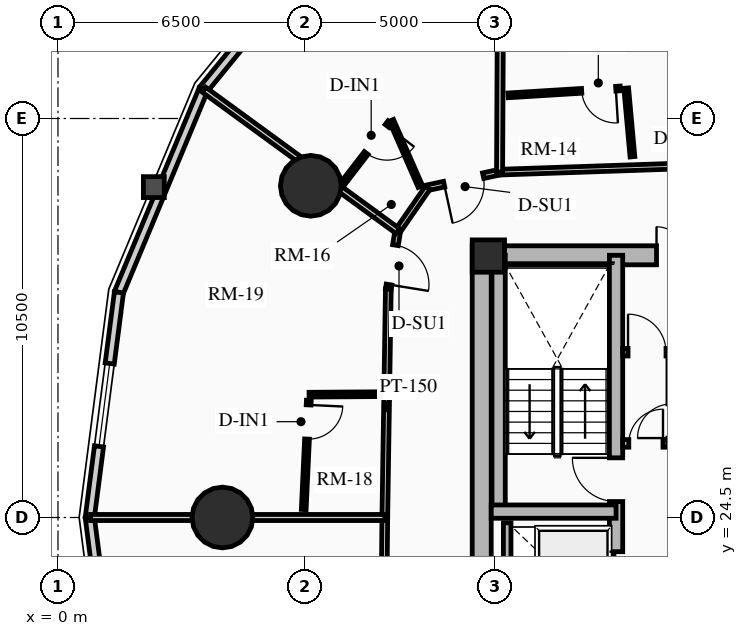
"""IFC4 building model, lengths in metres.
Left out: names, types, materials, properties, quantities, classifications, styles, units other than length and angle.
Written with IfcOpenShell. Run it as: python <this file> out.ifc"""

import sys

from ifc_helpers import new_model, si_unit, direction, frame, frame_2d, origin, origin_2d, place, context, subcontext, project, spatial, rectangle, circle, extrude, source, transform, mapped, element, fill, save


model = new_model("IFC4")
c1 = context("Model", 3, precision=1e-05, world=origin(), true_north=direction((0.0, 1.0)))
c2 = subcontext(c1, "Body", "Model", "MODEL_VIEW")
j1 = project(units=[si_unit("LENGTHUNIT", "METRE"), si_unit("PLANEANGLEUNIT", "RADIAN")], contexts=[c1])
p1 = place(None, origin())
s1 = spatial("IfcSite", under=j1, at=p1, CompositionType="ELEMENT")
p2 = place(p1, origin())
s2 = spatial("IfcBuilding", under=s1, at=p2, CompositionType="ELEMENT")
p3 = place(p2, frame((0.0, 0.0, 51.1)))
s3 = spatial("IfcBuildingStorey", under=s2, at=p3, CompositionType="ELEMENT", Elevation=51.1)
p4 = place(p3, frame((11.15, 17.35, 0.0), z_axis=(0.0, 0.0, 1.0), x_axis=(0.0, 1.0, 0.0)))
e1 = element("IfcWall", 1, at=p4, inside=s3, PredefinedType="SHEAR", context=c2, shape_type="SweptSolid", body=[
    extrude(rectangle(XDim=14.3, YDim=0.5, at=frame_2d((7.15, 0.0))), origin(), (0.0, 0.0, 1.0), 2.91),
])
p5 = place(p3, frame((11.15, 31.4, 0.0), z_axis=(0.0, 0.0, 1.0), x_axis=(1.0, 0.0, 0.0)))
e2 = element("IfcWall", 2, at=p5, inside=s3, PredefinedType="SHEAR", context=c2, shape_type="SweptSolid", body=[
    extrude(rectangle(XDim=10.7, YDim=0.5, at=frame_2d((5.35, 0.0))), origin(), (0.0, 0.0, 1.0), 2.91),
])
m1 = source(origin(), c2, "Body", "SweptSolid", [
    extrude(rectangle(XDim=1.5, YDim=2.02, at=frame_2d((0.75, 1.01))), frame((0.0, 0.26, 0.0), z_axis=(0.0, -1.0, 0.0), x_axis=(1.0, 0.0, 0.0)), (0.0, 0.0, 1.0), 0.52),
])
p6 = place(p5, frame((4.6, 0.0, 0.0)))
e3 = element("IfcOpeningElement", 3, at=p6, cuts=e2, PredefinedType="OPENING", context=c2, shape_type="MappedRepresentation", body=[
    mapped(m1, transform((0.0, 0.0, 0.0), x_axis=(1.0, 0.0, 0.0), y_axis=(0.0, 1.0, 0.0), z_axis=(0.0, 0.0, 1.0), scale=1.0)),
])
p7 = place(p3, frame((14.685, 17.6, 0.0), z_axis=(0.0, 0.0, 1.0), x_axis=(0.0, 1.0, 0.0)))
e4 = element("IfcWall", 4, at=p7, inside=s3, PredefinedType="SHEAR", context=c2, shape_type="SweptSolid", body=[
    extrude(rectangle(XDim=13.8, YDim=0.35, at=frame_2d((6.9, 0.0))), origin(), (0.0, 0.0, 1.0), 2.91),
])
m2 = source(origin(), c2, "Body", "SweptSolid", [
    extrude(rectangle(XDim=1.1, YDim=2.015, at=frame_2d((0.55, 1.007))), frame((0.0, 0.185, 0.0), z_axis=(0.0, -1.0, 0.0), x_axis=(1.0, 0.0, 0.0)), (0.0, 0.0, 1.0), 0.37),
])
p8 = place(p7, frame((4.9, 0.0, 0.0)))
e5 = element("IfcOpeningElement", 5, at=p8, cuts=e4, PredefinedType="OPENING", context=c2, shape_type="MappedRepresentation", body=[
    mapped(m2, transform((0.0, 0.0, 0.0), x_axis=(1.0, 0.0, 0.0), y_axis=(0.0, 1.0, 0.0), z_axis=(0.0, 0.0, 1.0), scale=1.0)),
])
m3 = source(origin(), c2, "Body", "SweptSolid", [
    extrude(rectangle(XDim=1.15, YDim=2.02, at=frame_2d((0.575, 1.01))), frame((0.0, 0.185, 0.0), z_axis=(0.0, -1.0, 0.0), x_axis=(1.0, 0.0, 0.0)), (0.0, 0.0, 1.0), 0.37),
])
p9 = place(p7, frame((7.32, 0.0, 0.0)))
e6 = element("IfcOpeningElement", 6, at=p9, cuts=e4, PredefinedType="OPENING", context=c2, shape_type="MappedRepresentation", body=[
    mapped(m3, transform((0.0, 0.0, 0.0), x_axis=(1.0, 0.0, 0.0), y_axis=(0.0, 1.0, 0.0), z_axis=(0.0, 0.0, 1.0), scale=1.0)),
])
p10 = place(p3, frame((11.595, 24.655, 0.0), z_axis=(0.0, 0.0, 1.0), x_axis=(0.0, 1.0, 0.0)))
e7 = element("IfcWall", 7, at=p10, inside=s3, PredefinedType="SHEAR", context=c2, shape_type="SweptSolid", body=[
    extrude(rectangle(XDim=6.745, YDim=0.35, at=frame_2d((3.373, 0.0))), origin(), (0.0, 0.0, 1.0), 2.91),
])
p11 = place(p3, frame((11.4, 24.655, 0.0), z_axis=(0.0, 0.0, 1.0), x_axis=(1.0, 0.0, 0.0)))
e8 = element("IfcWall", 8, at=p11, inside=s3, PredefinedType="SHEAR", context=c2, shape_type="SweptSolid", body=[
    extrude(rectangle(XDim=3.285, YDim=0.35, at=frame_2d((1.643, 0.0))), origin(), (0.0, 0.0, 1.0), 2.91),
])
p12 = place(p3, frame((11.325, 31.38, 0.0), z_axis=(0.0, 0.0, 1.0), x_axis=(1.0, 0.0, 0.0)))
e9 = element("IfcColumn", 9, at=p12, inside=s3, PredefinedType="COLUMN", context=c2, shape_type="SweptSolid", body=[
    extrude(rectangle(XDim=0.85, YDim=0.85, at=origin_2d()), origin(), (0.0, 0.0, 1.0), 2.91),
])
for number, where, z_axis, x_axis in (
    (10, (6.653, 33.229, 0.0), (0.0, 0.0, 1.0), (1.0, 0.0, 0.0)),
    (11, (4.328, 24.5, 0.0), (0.0, 0.0, 1.0), (1.0, 0.0, 0.0)),
):
    element("IfcColumn", number, at=place(p3, frame(where, z_axis=z_axis, x_axis=x_axis)), inside=s3, PredefinedType="USERDEFINED", context=c2, shape_type="SweptSolid", body=[
        extrude(circle(Radius=0.8, at=origin_2d()), origin(), (0.0, 0.0, 1.0), 2.91),
    ])
p13 = place(p3, frame((3.828, 35.768, 0.0), z_axis=(0.0, 0.0, 1.0), x_axis=(0.632713287022, 0.77438614168, 0.0)))
e12 = element("IfcWall", 12, at=p13, inside=s3, PredefinedType="SOLIDWALL", context=c2, shape_type="SweptSolid", body=[
    extrude(rectangle(XDim=5.477, YDim=0.24, at=frame_2d((2.738, 0.0))), origin(), (0.0, 0.0, 1.0), 2.073),
])
m4 = source(origin(), c2, "Body", "SweptSolid", [
    extrude(rectangle(XDim=1.9, YDim=1.35, at=frame_2d((0.95, 0.675))), frame((0.0, 0.13, 0.0), z_axis=(0.0, -1.0, 0.0), x_axis=(1.0, 0.0, 0.0)), (0.0, 0.0, 1.0), 0.26),
])
p14 = place(p13, frame((1.788, 0.0, 0.65)))
e13 = element("IfcOpeningElement", 13, at=p14, cuts=e12, PredefinedType="OPENING", context=c2, shape_type="MappedRepresentation", body=[
    mapped(m4, transform((0.0, 0.0, 0.0), x_axis=(1.0, 0.0, 0.0), y_axis=(0.0, 1.0, 0.0), z_axis=(0.0, 0.0, 1.0), scale=1.0)),
])
p15 = place(p3, frame((1.604, 30.424, 0.0), z_axis=(0.0, 0.0, 1.0), x_axis=(0.384348836956, 0.923187939442, 0.0)))
e14 = element("IfcWall", 14, at=p15, inside=s3, PredefinedType="SOLIDWALL", context=c2, shape_type="SweptSolid", body=[
    extrude(rectangle(XDim=5.789, YDim=0.24, at=frame_2d((2.894, 0.0))), origin(), (0.0, 0.0, 1.0), 2.073),
])
p16 = place(p3, frame((0.837, 24.5, 0.0), z_axis=(0.0, 0.0, 1.0), x_axis=(0.128339641463, 0.991730274031, 0.0)))
e15 = element("IfcWall", 15, at=p16, inside=s3, PredefinedType="SOLIDWALL", context=c2, shape_type="SweptSolid", body=[
    extrude(rectangle(XDim=5.973, YDim=0.24, at=frame_2d((2.987, 0.0))), origin(), (0.0, 0.0, 1.0), 2.073),
])
m5 = source(origin(), c2, "Body", "SweptSolid", [
    extrude(rectangle(XDim=2.2, YDim=1.35, at=frame_2d((1.1, 0.675))), frame((0.0, 0.13, 0.0), z_axis=(0.0, -1.0, 0.0), x_axis=(1.0, 0.0, 0.0)), (0.0, 0.0, 1.0), 0.26),
])
p17 = place(p16, frame((1.887, 0.0, 0.65)))
e16 = element("IfcOpeningElement", 16, at=p17, cuts=e15, PredefinedType="OPENING", context=c2, shape_type="MappedRepresentation", body=[
    mapped(m5, transform((0.0, 0.0, 0.0), x_axis=(1.0, 0.0, 0.0), y_axis=(0.0, 1.0, 0.0), z_axis=(0.0, 0.0, 1.0), scale=1.0)),
])
p18 = place(p3, frame((1.604, 18.576, 0.0), z_axis=(0.0, 0.0, 1.0), x_axis=(-0.128339641463, 0.991730274031, 0.0)))
e17 = element("IfcWall", 17, at=p18, inside=s3, PredefinedType="SOLIDWALL", context=c2, shape_type="SweptSolid", body=[
    extrude(rectangle(XDim=5.973, YDim=0.24, at=frame_2d((2.987, 0.0))), origin(), (0.0, 0.0, 1.0), 2.073),
])
p19 = place(p3, frame((11.82, 21.92, 0.0), z_axis=(0.0, 0.0, 1.0), x_axis=(0.0, 1.0, 0.0)))
e18 = element("IfcWall", 18, at=p19, inside=s3, PredefinedType="SHEAR", context=c2, shape_type="SweptSolid", body=[
    extrude(rectangle(XDim=2.44, YDim=0.2, at=frame_2d((1.22, 0.0))), origin(), (0.0, 0.0, 1.0), 2.91),
])
p20 = place(p3, frame((14.86, 26.45, 0.0), z_axis=(0.0, 0.0, 1.0), x_axis=(1.0, 0.0, 0.0)))
e19 = element("IfcWall", 19, at=p20, inside=s3, PredefinedType="PARTITIONING", context=c2, shape_type="SweptSolid", body=[
    extrude(rectangle(XDim=3.28, YDim=0.2, at=frame_2d((1.64, 0.0))), origin(), (0.0, 0.0, 1.0), 2.635),
])
m6 = source(origin(), c2, "Body", "SweptSolid", [
    extrude(rectangle(XDim=0.9, YDim=2.005, at=frame_2d((0.45, 1.002))), frame((0.0, 0.11, 0.0), z_axis=(0.0, -1.0, 0.0), x_axis=(1.0, 0.0, 0.0)), (0.0, 0.0, 1.0), 0.22),
])
p21 = place(p20, frame((0.16, 0.0, 0.0)))
e20 = element("IfcOpeningElement", 20, at=p21, cuts=e19, PredefinedType="OPENING", context=c2, shape_type="MappedRepresentation", body=[
    mapped(m6, transform((0.0, 0.0, 0.0), x_axis=(1.0, 0.0, 0.0), y_axis=(0.0, 1.0, 0.0), z_axis=(0.0, 0.0, 1.0), scale=1.0)),
])
p22 = place(p3, frame((16.15, 26.45, 0.0), z_axis=(0.0, 0.0, 1.0), x_axis=(0.0, 1.0, 0.0)))
e21 = element("IfcWall", 21, at=p22, inside=s3, PredefinedType="PARTITIONING", context=c2, shape_type="SweptSolid", body=[
    extrude(rectangle(XDim=2.4, YDim=0.2, at=frame_2d((1.2, 0.0))), origin(), (0.0, 0.0, 1.0), 2.635),
])
p23 = place(p22, frame((0.14, 0.0, 0.0)))
e22 = element("IfcOpeningElement", 22, at=p23, cuts=e21, PredefinedType="OPENING", context=c2, shape_type="MappedRepresentation", body=[
    mapped(m6, transform((0.0, 0.0, 0.0), x_axis=(1.0, 0.0, 0.0), y_axis=(0.0, 1.0, 0.0), z_axis=(0.0, 0.0, 1.0), scale=1.0)),
])
p24 = place(p3, frame((14.86, 28.85, 0.0), z_axis=(0.0, 0.0, 1.0), x_axis=(1.0, 0.0, 0.0)))
e23 = element("IfcWall", 23, at=p24, inside=s3, PredefinedType="PARTITIONING", context=c2, shape_type="SweptSolid", body=[
    extrude(rectangle(XDim=3.28, YDim=0.2, at=frame_2d((1.64, 0.0))), origin(), (0.0, 0.0, 1.0), 2.635),
])
m7 = source(origin(), c2, "Body", "SweptSolid", [
    extrude(rectangle(XDim=1.0, YDim=2.015, at=frame_2d((0.5, 1.007))), frame((0.0, 0.11, 0.0), z_axis=(0.0, -1.0, 0.0), x_axis=(1.0, 0.0, 0.0)), (0.0, 0.0, 1.0), 0.22),
])
p25 = place(p24, frame((0.14, 0.0, 0.0)))
e24 = element("IfcOpeningElement", 24, at=p25, cuts=e23, PredefinedType="OPENING", context=c2, shape_type="MappedRepresentation", body=[
    mapped(m7, transform((0.0, 0.0, 0.0), x_axis=(1.0, 0.0, 0.0), y_axis=(0.0, 1.0, 0.0), z_axis=(0.0, 0.0, 1.0), scale=1.0)),
])
p26 = place(p24, frame((2.05, 0.0, 0.0)))
e25 = element("IfcOpeningElement", 25, at=p26, cuts=e23, PredefinedType="OPENING", context=c2, shape_type="MappedRepresentation", body=[
    mapped(m6, transform((0.0, 0.0, 0.0), x_axis=(1.0, 0.0, 0.0), y_axis=(0.0, 1.0, 0.0), z_axis=(0.0, 0.0, 1.0), scale=1.0)),
])
p27 = place(p3, frame((18.143, 33.81, 0.0), z_axis=(0.0, 0.0, 1.0), x_axis=(-0.999423023908, -0.033964971394, 0.0)))
e26 = element("IfcWall", 26, at=p27, inside=s3, PredefinedType="PARTITIONING", context=c2, shape_type="SweptSolid", body=[
    extrude(rectangle(XDim=6.527, YDim=0.15, at=frame_2d((3.263, 0.0))), origin(), (0.0, 0.0, 1.0), 2.159),
])
p28 = place(p3, frame((11.62, 33.588, 0.0), z_axis=(0.0, 0.0, 1.0), x_axis=(-0.977392314559, -0.211433827571, 0.0)))
e27 = element("IfcWall", 27, at=p28, inside=s3, PredefinedType="PARTITIONING", context=c2, shape_type="SweptSolid", body=[
    extrude(rectangle(XDim=1.934, YDim=0.15, at=frame_2d((0.967, 0.0))), origin(), (0.0, 0.0, 1.0), 2.159),
])
m8 = source(origin(), c2, "Body", "SweptSolid", [
    extrude(rectangle(XDim=1.05, YDim=2.015, at=frame_2d((0.525, 1.007))), frame((0.0, 0.085, 0.0), z_axis=(0.0, -1.0, 0.0), x_axis=(1.0, 0.0, 0.0)), (0.0, 0.0, 1.0), 0.17),
])
p29 = place(p28, frame((0.442, 0.0, 0.0)))
e28 = element("IfcOpeningElement", 28, at=p29, cuts=e27, PredefinedType="OPENING", context=c2, shape_type="MappedRepresentation", body=[
    mapped(m8, transform((0.0, 0.0, 0.0), x_axis=(1.0, 0.0, 0.0), y_axis=(0.0, 1.0, 0.0), z_axis=(0.0, 0.0, 1.0), scale=1.0)),
])
p30 = place(p3, frame((9.729, 33.179, 0.0), z_axis=(0.0, 0.0, 1.0), x_axis=(-0.569155068352, -0.822230203878, 0.0)))
e29 = element("IfcWall", 29, at=p30, inside=s3, PredefinedType="PARTITIONING", context=c2, shape_type="SweptSolid", body=[
    extrude(rectangle(XDim=1.387, YDim=0.15, at=frame_2d((0.694, 0.0))), origin(), (0.0, 0.0, 1.0), 2.159),
])
p31 = place(p3, frame((8.94, 32.038, 0.0), z_axis=(0.0, 0.0, 1.0), x_axis=(-0.159917336462, -0.987130409571, 0.0)))
e30 = element("IfcWall", 30, at=p31, inside=s3, PredefinedType="PARTITIONING", context=c2, shape_type="SweptSolid", body=[
    extrude(rectangle(XDim=1.547, YDim=0.15, at=frame_2d((0.773, 0.0))), origin(), (0.0, 0.0, 1.0), 2.205),
])
p32 = place(p31, frame((0.377, 0.0, 0.0)))
e31 = element("IfcOpeningElement", 31, at=p32, cuts=e30, PredefinedType="OPENING", context=c2, shape_type="MappedRepresentation", body=[
    mapped(m8, transform((0.0, 0.0, 0.0), x_axis=(1.0, 0.0, 0.0), y_axis=(0.0, 1.0, 0.0), z_axis=(0.0, 0.0, 1.0), scale=1.0)),
])
p33 = place(p3, frame((8.693, 30.512, 0.0), z_axis=(0.0, 0.0, 1.0), x_axis=(-0.015389665197, -0.99988157209, 0.0)))
e32 = element("IfcWall", 32, at=p33, inside=s3, PredefinedType="PARTITIONING", context=c2, shape_type="SweptSolid", body=[
    extrude(rectangle(XDim=6.012, YDim=0.15, at=frame_2d((3.006, 0.0))), origin(), (0.0, 0.0, 1.0), 2.635),
])
p34 = place(p3, frame((8.6, 24.5, 0.0), z_axis=(0.0, 0.0, 1.0), x_axis=(-0.010076760723, -0.999949228158, 0.0)))
e33 = element("IfcWall", 33, at=p34, inside=s3, PredefinedType="PARTITIONING", context=c2, shape_type="SweptSolid", body=[
    extrude(rectangle(XDim=6.13, YDim=0.15, at=frame_2d((3.065, 0.0))), origin(), (0.0, 0.0, 1.0), 2.159),
])
p35 = place(p34, frame((2.54, 0.0, 0.0)))
e34 = element("IfcOpeningElement", 34, at=p35, cuts=e33, PredefinedType="OPENING", context=c2, shape_type="MappedRepresentation", body=[
    mapped(m8, transform((0.0, 0.0, 0.0), x_axis=(1.0, 0.0, 0.0), y_axis=(0.0, 1.0, 0.0), z_axis=(0.0, 0.0, 1.0), scale=1.0)),
])
p36 = place(p3, frame((11.62, 33.588, 0.0), z_axis=(0.0, 0.0, 1.0), x_axis=(0.005056791532, 0.999987214348, 0.0)))
e35 = element("IfcWall", 35, at=p36, inside=s3, PredefinedType="PARTITIONING", context=c2, shape_type="SweptSolid", body=[
    extrude(rectangle(XDim=9.125, YDim=0.16, at=frame_2d((4.562, 0.0))), origin(), (0.0, 0.0, 1.0), 2.073),
])
p37 = place(p3, frame((8.94, 32.038, 0.0), z_axis=(0.0, 0.0, 1.0), x_axis=(-0.807831293846, 0.58941377714, 0.0)))
e36 = element("IfcWall", 36, at=p37, inside=s3, PredefinedType="PARTITIONING", context=c2, shape_type="SweptSolid", body=[
    extrude(rectangle(XDim=6.308, YDim=0.16, at=frame_2d((3.154, 0.0))), origin(), (0.0, 0.0, 1.0), 2.073),
])
p38 = place(p3, frame((8.6, 24.5, 0.0), z_axis=(0.0, 0.0, 1.0), x_axis=(-1.0, 0.0, 0.0)))
e37 = element("IfcWall", 37, at=p38, inside=s3, PredefinedType="PARTITIONING", context=c2, shape_type="SweptSolid", body=[
    extrude(rectangle(XDim=7.743, YDim=0.16, at=frame_2d((3.872, 0.0))), origin(), (0.0, 0.0, 1.0), 2.073),
])
p39 = place(p3, frame((15.116, 33.993, 0.0), z_axis=(0.0, 0.0, 1.0), x_axis=(-0.090547877021, 0.995892103577, 0.0)))
e38 = element("IfcWall", 38, at=p39, inside=s3, PredefinedType="PARTITIONING", context=c2, shape_type="SweptSolid", body=[
    extrude(rectangle(XDim=1.815, YDim=0.125, at=frame_2d((0.907, 0.0))), origin(), (0.0, 0.0, 1.0), 2.635),
])
p40 = place(p3, frame((14.798, 35.791, 0.0), z_axis=(0.0, 0.0, 1.0), x_axis=(-0.998108365817, -0.06147918417, 0.0)))
e39 = element("IfcWall", 39, at=p40, inside=s3, PredefinedType="PARTITIONING", context=c2, shape_type="SweptSolid", body=[
    extrude(rectangle(XDim=2.958, YDim=0.125, at=frame_2d((1.479, 0.0))), origin(), (0.0, 0.0, 1.0), 2.159),
])
m9 = source(origin(), c2, "Body", "SweptSolid", [
    extrude(rectangle(XDim=0.9, YDim=2.005, at=frame_2d((0.45, 1.002))), frame((0.0, 0.073, 0.0), z_axis=(0.0, -1.0, 0.0), x_axis=(1.0, 0.0, 0.0)), (0.0, 0.0, 1.0), 0.145),
])
p41 = place(p40, frame((0.12, 0.0, 0.0)))
e40 = element("IfcOpeningElement", 40, at=p41, cuts=e39, PredefinedType="OPENING", context=c2, shape_type="MappedRepresentation", body=[
    mapped(m9, transform((0.0, 0.0, 0.0), x_axis=(1.0, 0.0, 0.0), y_axis=(0.0, 1.0, 0.0), z_axis=(0.0, 0.0, 1.0), scale=1.0)),
])
p42 = place(p3, frame((9.535, 33.211, 0.0), z_axis=(0.0, 0.0, 1.0), x_axis=(-0.401687955793, 0.915776602765, 0.0)))
e41 = element("IfcWall", 41, at=p42, inside=s3, PredefinedType="PARTITIONING", context=c2, shape_type="SweptSolid", body=[
    extrude(rectangle(XDim=1.901, YDim=0.125, at=frame_2d((0.95, 0.0))), origin(), (0.0, 0.0, 1.0), 2.635),
])
p43 = place(p3, frame((8.732, 34.899, 0.0), z_axis=(0.0, 0.0, 1.0), x_axis=(-0.609677010074, -0.792649950096, 0.0)))
e42 = element("IfcWall", 42, at=p43, inside=s3, PredefinedType="PARTITIONING", context=c2, shape_type="SweptSolid", body=[
    extrude(rectangle(XDim=2.097, YDim=0.125, at=frame_2d((1.049, 0.0))), origin(), (0.0, 0.0, 1.0), 2.073),
])
p44 = place(p43, frame((0.12, 0.0, 0.0)))
e43 = element("IfcOpeningElement", 43, at=p44, cuts=e42, PredefinedType="OPENING", context=c2, shape_type="MappedRepresentation", body=[
    mapped(m9, transform((0.0, 0.0, 0.0), x_axis=(1.0, 0.0, 0.0), y_axis=(0.0, 1.0, 0.0), z_axis=(0.0, 0.0, 1.0), scale=1.0)),
])
p45 = place(p3, frame((8.429, 27.745, 0.0), z_axis=(0.0, 0.0, 1.0), x_axis=(-0.999976632219, -0.006836301373, 0.0)))
e44 = element("IfcWall", 44, at=p45, inside=s3, PredefinedType="PARTITIONING", context=c2, shape_type="SweptSolid", body=[
    extrude(rectangle(XDim=1.821, YDim=0.125, at=frame_2d((0.911, 0.0))), origin(), (0.0, 0.0, 1.0), 2.635),
])
p46 = place(p3, frame((6.6, 27.583, 0.0), z_axis=(0.0, 0.0, 1.0), x_axis=(-0.046516553412, -0.998917519247, 0.0)))
e45 = element("IfcWall", 45, at=p46, inside=s3, PredefinedType="PARTITIONING", context=c2, shape_type="SweptSolid", body=[
    extrude(rectangle(XDim=2.876, YDim=0.125, at=frame_2d((1.438, 0.0))), origin(), (0.0, 0.0, 1.0), 2.635),
])
p47 = place(p46, frame((0.12, 0.0, 0.0)))
e46 = element("IfcOpeningElement", 46, at=p47, cuts=e45, PredefinedType="OPENING", context=c2, shape_type="MappedRepresentation", body=[
    mapped(m9, transform((0.0, 0.0, 0.0), x_axis=(1.0, 0.0, 0.0), y_axis=(0.0, 1.0, 0.0), z_axis=(0.0, 0.0, 1.0), scale=1.0)),
])
m10 = source(origin(), c2, "Body", "SweptSolid", [
    extrude(rectangle(XDim=2.2, YDim=1.35, at=frame_2d((1.1, 0.675))), frame((0.0, 0.03, 0.0), z_axis=(0.0, -1.0, 0.0), x_axis=(1.0, 0.0, 0.0)), (0.0, 0.0, 1.0), 0.06),
])
p48 = place(p17, origin())
e47 = element("IfcWindow", 47, at=p48, inside=s3, PartitioningType="DOUBLE_PANEL_VERTICAL", PredefinedType="WINDOW", context=c2, shape_type="MappedRepresentation", body=[
    mapped(m10, transform((0.0, 0.0, 0.0), x_axis=(1.0, 0.0, 0.0), y_axis=(0.0, 1.0, 0.0), z_axis=(0.0, 0.0, 1.0), scale=1.0)),
])
fill(e16, e47)
m11 = source(origin(), c2, "Body", "SweptSolid", [
    extrude(rectangle(XDim=1.1, YDim=2.015, at=frame_2d((0.55, 1.007))), frame((0.0, 0.025, 0.0), z_axis=(0.0, -1.0, 0.0), x_axis=(1.0, 0.0, 0.0)), (0.0, 0.0, 1.0), 0.05),
])
p49 = place(p8, origin())
e48 = element("IfcDoor", 48, at=p49, inside=s3, OperationType="SLIDING_TO_RIGHT", PredefinedType="DOOR", context=c2, shape_type="MappedRepresentation", body=[
    mapped(m11, transform((0.0, 0.0, 0.0), x_axis=(1.0, 0.0, 0.0), y_axis=(0.0, 1.0, 0.0), z_axis=(0.0, 0.0, 1.0), scale=1.0)),
])
fill(e5, e48)
m12 = source(origin(), c2, "Body", "SweptSolid", [
    extrude(rectangle(XDim=1.15, YDim=2.02, at=frame_2d((0.575, 1.01))), frame((0.0, 0.025, 0.0), z_axis=(0.0, -1.0, 0.0), x_axis=(1.0, 0.0, 0.0)), (0.0, 0.0, 1.0), 0.05),
])
p50 = place(p9, origin())
e49 = element("IfcDoor", 49, at=p50, inside=s3, OperationType="SINGLE_SWING_RIGHT", PredefinedType="DOOR", context=c2, shape_type="MappedRepresentation", body=[
    mapped(m12, transform((0.0, 0.0, 0.0), x_axis=(1.0, 0.0, 0.0), y_axis=(0.0, 1.0, 0.0), z_axis=(0.0, 0.0, 1.0), scale=1.0)),
])
fill(e6, e49)
m13 = source(origin(), c2, "Body", "SweptSolid", [
    extrude(rectangle(XDim=1.5, YDim=2.02, at=frame_2d((0.75, 1.01))), frame((0.0, 0.025, 0.0), z_axis=(0.0, -1.0, 0.0), x_axis=(1.0, 0.0, 0.0)), (0.0, 0.0, 1.0), 0.05),
])
p51 = place(p6, origin())
e50 = element("IfcDoor", 50, at=p51, inside=s3, OperationType="DOUBLE_DOOR_SINGLE_SWING", PredefinedType="DOOR", context=c2, shape_type="MappedRepresentation", body=[
    mapped(m13, transform((0.0, 0.0, 0.0), x_axis=(1.0, 0.0, 0.0), y_axis=(0.0, 1.0, 0.0), z_axis=(0.0, 0.0, 1.0), scale=1.0)),
])
fill(e3, e50)
m14 = source(origin(), c2, "Body", "SweptSolid", [
    extrude(rectangle(XDim=0.9, YDim=2.005, at=frame_2d((0.45, 1.002))), frame((0.0, 0.025, 0.0), z_axis=(0.0, -1.0, 0.0), x_axis=(1.0, 0.0, 0.0)), (0.0, 0.0, 1.0), 0.05),
])
p52 = place(p21, origin())
e51 = element("IfcDoor", 51, at=p52, inside=s3, OperationType="SINGLE_SWING_RIGHT", PredefinedType="DOOR", context=c2, shape_type="MappedRepresentation", body=[
    mapped(m14, transform((0.0, 0.0, 0.0), x_axis=(1.0, 0.0, 0.0), y_axis=(0.0, 1.0, 0.0), z_axis=(0.0, 0.0, 1.0), scale=1.0)),
])
fill(e20, e51)
m15 = source(origin(), c2, "Body", "SweptSolid", [
    extrude(rectangle(XDim=1.0, YDim=2.015, at=frame_2d((0.5, 1.007))), frame((0.0, 0.025, 0.0), z_axis=(0.0, -1.0, 0.0), x_axis=(1.0, 0.0, 0.0)), (0.0, 0.0, 1.0), 0.05),
])
p53 = place(p25, origin())
e52 = element("IfcDoor", 52, at=p53, inside=s3, OperationType="SINGLE_SWING_LEFT", PredefinedType="DOOR", context=c2, shape_type="MappedRepresentation", body=[
    mapped(m15, transform((0.0, 0.0, 0.0), x_axis=(1.0, 0.0, 0.0), y_axis=(0.0, 1.0, 0.0), z_axis=(0.0, 0.0, 1.0), scale=1.0)),
])
fill(e24, e52)
p54 = place(p41, origin())
e53 = element("IfcDoor", 53, at=p54, inside=s3, OperationType="SINGLE_SWING_LEFT", PredefinedType="DOOR", context=c2, shape_type="MappedRepresentation", body=[
    mapped(m14, transform((0.0, 0.0, 0.0), x_axis=(1.0, 0.0, 0.0), y_axis=(0.0, 1.0, 0.0), z_axis=(0.0, 0.0, 1.0), scale=1.0)),
])
fill(e40, e53)
m16 = source(origin(), c2, "Body", "SweptSolid", [
    extrude(rectangle(XDim=1.05, YDim=2.015, at=frame_2d((0.525, 1.007))), frame((0.0, 0.025, 0.0), z_axis=(0.0, -1.0, 0.0), x_axis=(1.0, 0.0, 0.0)), (0.0, 0.0, 1.0), 0.05),
])
p55 = place(p29, origin())
e54 = element("IfcDoor", 54, at=p55, inside=s3, OperationType="SINGLE_SWING_RIGHT", PredefinedType="DOOR", context=c2, shape_type="MappedRepresentation", body=[
    mapped(m16, transform((0.0, 0.0, 0.0), x_axis=(1.0, 0.0, 0.0), y_axis=(0.0, 1.0, 0.0), z_axis=(0.0, 0.0, 1.0), scale=1.0)),
])
fill(e28, e54)
p56 = place(p44, origin())
e55 = element("IfcDoor", 55, at=p56, inside=s3, OperationType="SINGLE_SWING_LEFT", PredefinedType="DOOR", context=c2, shape_type="MappedRepresentation", body=[
    mapped(m14, transform((0.0, 0.0, 0.0), x_axis=(1.0, 0.0, 0.0), y_axis=(0.0, 1.0, 0.0), z_axis=(0.0, 0.0, 1.0), scale=1.0)),
])
fill(e43, e55)
p57 = place(p32, origin())
e56 = element("IfcDoor", 56, at=p57, inside=s3, OperationType="SINGLE_SWING_RIGHT", PredefinedType="DOOR", context=c2, shape_type="MappedRepresentation", body=[
    mapped(m16, transform((0.0, 0.0, 0.0), x_axis=(1.0, 0.0, 0.0), y_axis=(0.0, 1.0, 0.0), z_axis=(0.0, 0.0, 1.0), scale=1.0)),
])
fill(e31, e56)
p58 = place(p47, origin())
e57 = element("IfcDoor", 57, at=p58, inside=s3, OperationType="SINGLE_SWING_LEFT", PredefinedType="DOOR", context=c2, shape_type="MappedRepresentation", body=[
    mapped(m14, transform((0.0, 0.0, 0.0), x_axis=(1.0, 0.0, 0.0), y_axis=(0.0, 1.0, 0.0), z_axis=(0.0, 0.0, 1.0), scale=1.0)),
])
fill(e46, e57)
save(model, sys.argv[1])
